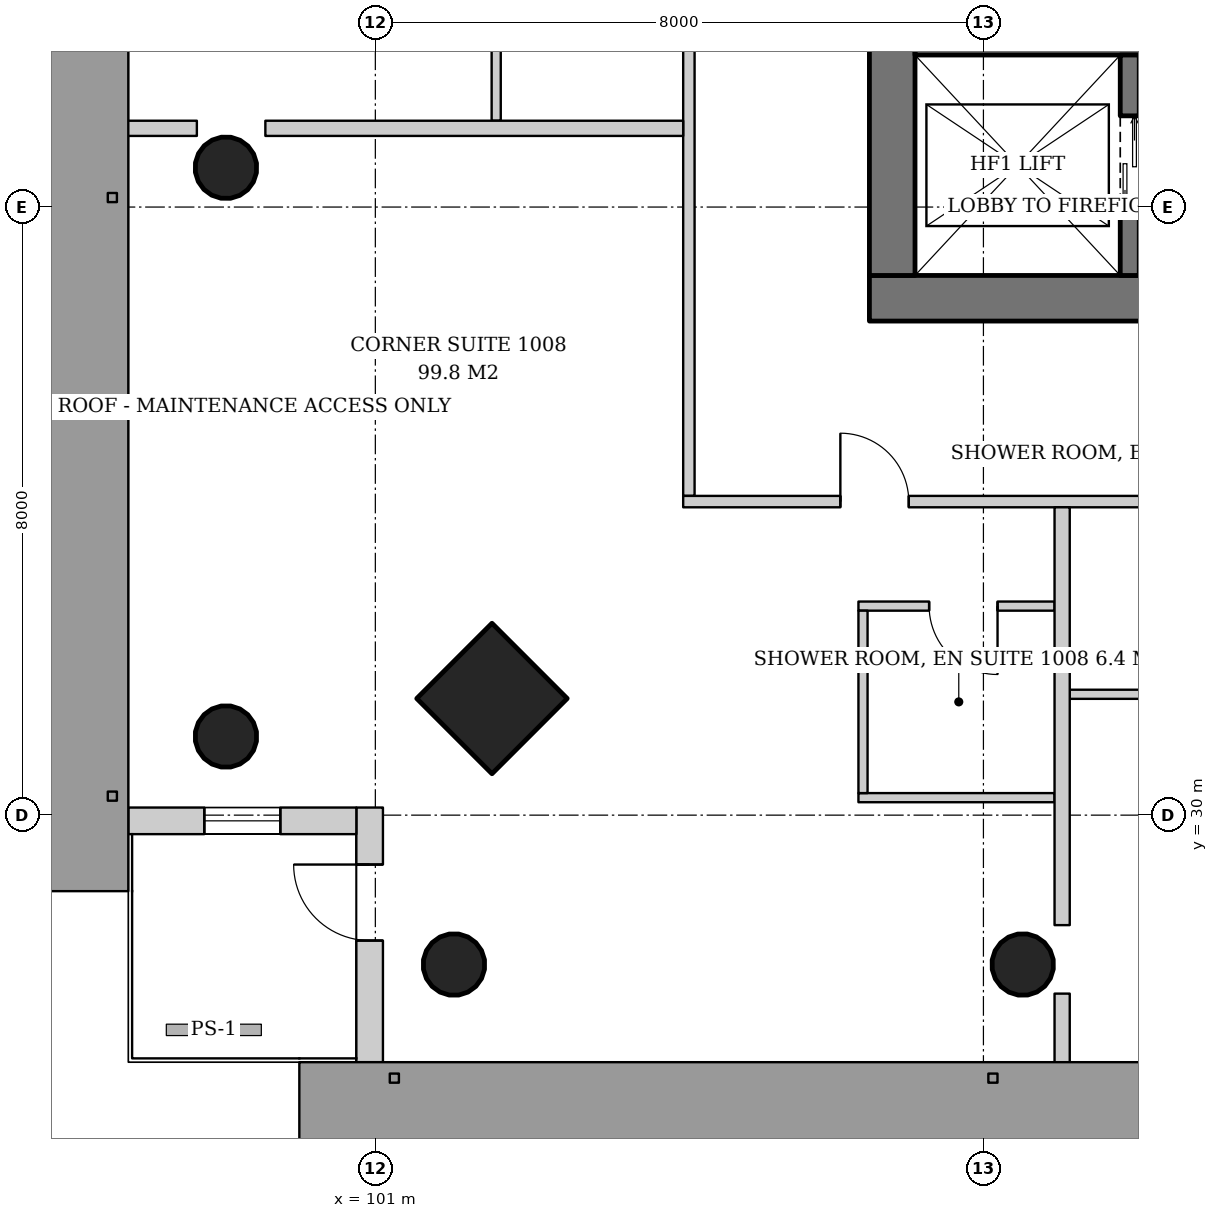
"""IFC4 building model, lengths in metres.
Left out: names, types, materials, properties, quantities, classifications, styles, units other than length and angle.
Written with IfcOpenShell. Run it as: python <this file> out.ifc"""

import sys

from ifc_helpers import new_model, si_unit, direction, frame, frame_2d, origin, origin_2d, place, context, subcontext, project, spatial, rectangle, hollow_circle, extrude, element, fill, save


model = new_model("IFC4")
c1 = context("Model", 3, precision=1e-05, world=origin(), true_north=direction((0.0, 1.0)))
c2 = subcontext(c1, "Body", "Model", "MODEL_VIEW")
j1 = project(units=[si_unit("LENGTHUNIT", "METRE"), si_unit("PLANEANGLEUNIT", "RADIAN")], contexts=[c1])
p1 = place(None, origin())
s1 = spatial("IfcSite", under=j1, at=p1, CompositionType="ELEMENT")
p2 = place(p1, origin())
s2 = spatial("IfcBuilding", under=s1, at=p2, CompositionType="ELEMENT")
p3 = place(p2, frame((0.0, 0.0, 43.8)))
s3 = spatial("IfcBuildingStorey", under=s2, at=p3, CompositionType="ELEMENT", Elevation=43.8)
p4 = place(p3, frame((102.483, 31.483, 0.0), z_axis=(0.043029647111, 0.043029647111, 0.998146732169), x_axis=(-0.707106781187, 0.707106781187, 0.0)))
e1 = element("IfcColumn", 1, at=p4, inside=s3, PredefinedType="COLUMN", context=c2, shape_type="SweptSolid", body=[
    extrude(rectangle(XDim=1.4, YDim=1.4, at=origin_2d()), origin(), (0.0, 0.0, 1.0), 3.807),
])
p5 = place(p3, frame((98.983, 30.983, 0.0), z_axis=(0.043029647111, 0.043029647111, 0.998146732169), x_axis=(-0.707106781187, 0.707106781187, 0.0)))
e2 = element("IfcColumn", 2, at=p5, inside=s3, PredefinedType="COLUMN", context=c2, shape_type="SweptSolid", body=[
    extrude(hollow_circle(Radius=0.406, WallThickness=0.03, at=origin_2d()), origin(), (0.0, 0.0, 1.0), 3.807),
])
p6 = place(p3, frame((98.983, 38.491, 0.0), z_axis=(0.043059584825, 0.021497706284, 0.998841188968), x_axis=(-0.446680166538, 0.894693706707, 0.0)))
e3 = element("IfcColumn", 3, at=p6, inside=s3, PredefinedType="COLUMN", context=c2, shape_type="SweptSolid", body=[
    extrude(hollow_circle(Radius=0.406, WallThickness=0.03, at=origin_2d()), origin(), (0.0, 0.0, 1.0), 3.804),
])
p7 = place(p3, frame((101.983, 27.983, 0.0), z_axis=(0.043029647111, 0.043029647111, 0.998146732169), x_axis=(-0.707106781187, 0.707106781187, 0.0)))
e4 = element("IfcColumn", 4, at=p7, inside=s3, PredefinedType="COLUMN", context=c2, shape_type="SweptSolid", body=[
    extrude(hollow_circle(Radius=0.406, WallThickness=0.03, at=origin_2d()), origin(), (0.0, 0.0, 1.0), 3.807),
])
p8 = place(p3, frame((109.491, 27.983, 0.0), z_axis=(0.021497706284, 0.043059584825, 0.998841188968), x_axis=(-0.894693706707, 0.446680166538, 0.0)))
e5 = element("IfcColumn", 5, at=p8, inside=s3, PredefinedType="COLUMN", context=c2, shape_type="SweptSolid", body=[
    extrude(hollow_circle(Radius=0.406, WallThickness=0.03, at=origin_2d()), origin(), (0.0, 0.0, 1.0), 3.804),
])
p9 = place(p3, frame((107.5, 36.8, 0.0), z_axis=(0.0, 0.0, 1.0), x_axis=(1.0, 0.0, 0.0)))
e6 = element("IfcWall", 6, at=p9, inside=s3, PredefinedType="SHEAR", context=c2, shape_type="SweptSolid", body=[
    extrude(rectangle(XDim=19.0, YDim=0.6, at=frame_2d((9.5, 0.0))), origin(), (0.0, 0.0, 1.0), 3.8),
])
p10 = place(p9, frame((3.9, 0.0, 0.0)))
e7 = element("IfcOpeningElement", 7, at=p10, cuts=e6, PredefinedType="OPENING", context=c2, shape_type="SweptSolid", body=[
    extrude(rectangle(XDim=1.0, YDim=2.1, at=frame_2d((0.5, 1.05))), frame((0.0, 0.31, 0.0), z_axis=(0.0, -1.0, 0.0), x_axis=(1.0, 0.0, 0.0)), (0.0, 0.0, 1.0), 0.62),
])
p11 = place(p9, frame((14.792, 0.0, 0.0)))
e8 = element("IfcOpeningElement", 8, at=p11, cuts=e6, PredefinedType="OPENING", context=c2, shape_type="SweptSolid", body=[
    extrude(rectangle(XDim=1.0, YDim=2.1, at=frame_2d((0.5, 1.05))), frame((0.0, 0.31, 0.0), z_axis=(0.0, -1.0, 0.0), x_axis=(1.0, 0.0, 0.0)), (0.0, 0.0, 1.0), 0.62),
])
p12 = place(p9, frame((17.005, 0.0, 0.0)))
e9 = element("IfcOpeningElement", 9, at=p12, cuts=e6, PredefinedType="OPENING", context=c2, shape_type="SweptSolid", body=[
    extrude(rectangle(XDim=1.0, YDim=2.1, at=frame_2d((0.5, 1.05))), frame((0.0, 0.31, 0.0), z_axis=(0.0, -1.0, 0.0), x_axis=(1.0, 0.0, 0.0)), (0.0, 0.0, 1.0), 0.62),
])
p13 = place(p3, frame((107.8, 37.1, 0.0), z_axis=(0.0, 0.0, 1.0), x_axis=(0.0, 1.0, 0.0)))
e10 = element("IfcWall", 10, at=p13, inside=s3, PredefinedType="SHEAR", context=c2, shape_type="SweptSolid", body=[
    extrude(rectangle(XDim=17.8, YDim=0.6, at=frame_2d((8.9, 0.0))), origin(), (0.0, 0.0, 1.0), 3.8),
])
p14 = place(p13, frame((8.0, 0.0, 0.0)))
e11 = element("IfcOpeningElement", 11, at=p14, cuts=e10, PredefinedType="OPENING", context=c2, shape_type="SweptSolid", body=[
    extrude(rectangle(XDim=1.8, YDim=2.4, at=frame_2d((0.9, 1.2))), frame((0.0, 0.31, 0.0), z_axis=(0.0, -1.0, 0.0), x_axis=(1.0, 0.0, 0.0)), (0.0, 0.0, 1.0), 0.62),
])
p15 = place(p3, frame((108.1, 40.2, 0.0), z_axis=(0.0, 0.0, 1.0), x_axis=(1.0, 0.0, 0.0)))
e12 = element("IfcWall", 12, at=p15, inside=s3, PredefinedType="SHEAR", context=c2, shape_type="SweptSolid", body=[
    extrude(rectangle(XDim=17.8, YDim=0.4, at=frame_2d((8.9, 0.0))), origin(), (0.0, 0.0, 1.0), 3.8),
])
p16 = place(p3, frame((100.925, 26.75, 0.0), z_axis=(0.0, 0.0, 1.0), x_axis=(0.0, 1.0, 0.0)))
e13 = element("IfcWall", 13, at=p16, inside=s3, PredefinedType="SOLIDWALL", context=c2, shape_type="SweptSolid", body=[
    extrude(rectangle(XDim=3.35, YDim=0.35, at=frame_2d((1.675, 0.0))), origin(), (0.0, 0.0, 1.0), 3.6),
])
p17 = place(p16, frame((1.6, 0.0, 0.0)))
e14 = element("IfcOpeningElement", 14, at=p17, cuts=e13, PredefinedType="OPENING", context=c2, shape_type="SweptSolid", body=[
    extrude(rectangle(XDim=1.0, YDim=2.4, at=frame_2d((0.5, 1.2))), frame((0.0, 0.185, 0.0), z_axis=(0.0, -1.0, 0.0), x_axis=(1.0, 0.0, 0.0)), (0.0, 0.0, 1.0), 0.37),
])
p18 = place(p3, frame((100.75, 29.925, 0.0), z_axis=(0.0, 0.0, 1.0), x_axis=(-1.0, 0.0, 0.0)))
e15 = element("IfcWall", 15, at=p18, inside=s3, PredefinedType="SOLIDWALL", context=c2, shape_type="SweptSolid", body=[
    extrude(rectangle(XDim=3.0, YDim=0.35, at=frame_2d((1.5, 0.0))), origin(), (0.0, 0.0, 1.0), 3.6),
])
p19 = place(p18, frame((1.0, 0.0, 0.9)))
e16 = element("IfcOpeningElement", 16, at=p19, cuts=e15, PredefinedType="OPENING", context=c2, shape_type="SweptSolid", body=[
    extrude(rectangle(XDim=1.0, YDim=2.4, at=frame_2d((0.5, 1.2))), frame((0.0, 0.185, 0.0), z_axis=(0.0, -1.0, 0.0), x_axis=(1.0, 0.0, 0.0)), (0.0, 0.0, 1.0), 0.37),
])
p20 = place(p3, frame((110.925, 37.1, 0.0), z_axis=(0.0, 0.0, 1.0), x_axis=(0.0, 1.0, 0.0)))
e17 = element("IfcWall", 17, at=p20, inside=s3, PredefinedType="SHEAR", context=c2, shape_type="SweptSolid", body=[
    extrude(rectangle(XDim=2.9, YDim=0.25, at=frame_2d((1.45, 0.0))), origin(), (0.0, 0.0, 1.0), 3.8),
])
p21 = place(p20, frame((0.8, 0.0, 0.0)))
e18 = element("IfcOpeningElement", 18, at=p21, cuts=e17, PredefinedType="OPENING", context=c2, shape_type="SweptSolid", body=[
    extrude(rectangle(XDim=1.3, YDim=2.2, at=frame_2d((0.65, 1.1))), frame((0.0, 0.135, 0.0), z_axis=(0.0, -1.0, 0.0), x_axis=(1.0, 0.0, 0.0)), (0.0, 0.0, 1.0), 0.27),
])
p22 = place(p3, frame((102.59, 41.556, 0.0), z_axis=(0.0, 0.0, 1.0), x_axis=(0.0, -1.0, 0.0)))
e19 = element("IfcWall", 19, at=p22, inside=s3, PredefinedType="PARTITIONING", context=c2, shape_type="SweptSolid", body=[
    extrude(rectangle(XDim=2.42, YDim=0.12, at=frame_2d((1.21, 0.0))), origin(), (0.0, 0.0, 1.0), 2.847),
])
p23 = place(p3, frame((105.125, 57.95, 0.0), z_axis=(0.0, 0.0, 1.0), x_axis=(0.0, -1.0, 0.0)))
e20 = element("IfcWall", 20, at=p23, inside=s3, PredefinedType="PARTITIONING", context=c2, shape_type="SweptSolid", body=[
    extrude(rectangle(XDim=23.75, YDim=0.15, at=frame_2d((11.875, 0.0))), origin(), (0.0, 0.0, 1.0), 2.8),
])
p24 = place(p23, frame((2.068, 0.0, 0.0)))
e21 = element("IfcOpeningElement", 21, at=p24, cuts=e20, PredefinedType="OPENING", context=c2, shape_type="SweptSolid", body=[
    extrude(rectangle(XDim=0.9, YDim=2.1, at=frame_2d((0.45, 1.05))), frame((0.0, 0.085, 0.0), z_axis=(0.0, -1.0, 0.0), x_axis=(1.0, 0.0, 0.0)), (0.0, 0.0, 1.0), 0.17),
])
p25 = place(p23, frame((7.686, 0.0, 0.0)))
e22 = element("IfcOpeningElement", 22, at=p25, cuts=e20, PredefinedType="OPENING", context=c2, shape_type="SweptSolid", body=[
    extrude(rectangle(XDim=1.0, YDim=2.1, at=frame_2d((0.5, 1.05))), frame((0.0, 0.085, 0.0), z_axis=(0.0, -1.0, 0.0), x_axis=(1.0, 0.0, 0.0)), (0.0, 0.0, 1.0), 0.17),
])
p26 = place(p23, frame((12.379, 0.0, 0.0)))
e23 = element("IfcOpeningElement", 23, at=p26, cuts=e20, PredefinedType="OPENING", context=c2, shape_type="SweptSolid", body=[
    extrude(rectangle(XDim=0.9, YDim=2.1, at=frame_2d((0.45, 1.05))), frame((0.0, 0.085, 0.0), z_axis=(0.0, -1.0, 0.0), x_axis=(1.0, 0.0, 0.0)), (0.0, 0.0, 1.0), 0.17),
])
p27 = place(p23, frame((15.264, 0.0, 0.0)))
e24 = element("IfcOpeningElement", 24, at=p27, cuts=e20, PredefinedType="OPENING", context=c2, shape_type="SweptSolid", body=[
    extrude(rectangle(XDim=0.9, YDim=2.1, at=frame_2d((0.45, 1.05))), frame((0.0, 0.085, 0.0), z_axis=(0.0, -1.0, 0.0), x_axis=(1.0, 0.0, 0.0)), (0.0, 0.0, 1.0), 0.17),
])
p28 = place(p3, frame((105.05, 39.036, 0.0), z_axis=(0.0, 0.0, 1.0), x_axis=(-1.0, 0.0, 0.0)))
e25 = element("IfcWall", 25, at=p28, inside=s3, PredefinedType="PARTITIONING", context=c2, shape_type="SweptSolid", body=[
    extrude(rectangle(XDim=5.497, YDim=0.2, at=frame_2d((2.749, 0.0))), origin(), (0.0, 0.0, 1.0), 3.6),
])
p29 = place(p3, frame((98.652, 39.036, 0.0), z_axis=(0.0, 0.0, 1.0), x_axis=(-1.0, 0.0, 0.0)))
e26 = element("IfcWall", 26, at=p29, inside=s3, PredefinedType="PARTITIONING", context=c2, shape_type="SweptSolid", body=[
    extrude(rectangle(XDim=0.942, YDim=0.2, at=frame_2d((0.471, 0.0))), origin(), (0.0, 0.0, 1.0), 3.6),
])
p30 = place(p3, frame((109.936, 32.75, 0.0), z_axis=(0.0, 0.0, 1.0), x_axis=(-1.0, 0.0, 0.0)))
e27 = element("IfcWall", 27, at=p30, inside=s3, PredefinedType="PARTITIONING", context=c2, shape_type="SweptSolid", body=[
    extrude(rectangle(XDim=2.58, YDim=0.12, at=frame_2d((1.29, 0.0))), origin(), (0.0, 0.0, 1.0), 2.8),
])
p31 = place(p30, frame((0.75, 0.0, 0.0)))
e28 = element("IfcOpeningElement", 28, at=p31, cuts=e27, PredefinedType="OPENING", context=c2, shape_type="SweptSolid", body=[
    extrude(rectangle(XDim=0.9, YDim=2.1, at=frame_2d((0.45, 1.05))), frame((0.0, 0.07, 0.0), z_axis=(0.0, -1.0, 0.0), x_axis=(1.0, 0.0, 0.0)), (0.0, 0.0, 1.0), 0.14),
])
p32 = place(p3, frame((109.936, 30.23, 0.0), z_axis=(0.0, 0.0, 1.0), x_axis=(-1.0, 0.0, 0.0)))
e29 = element("IfcWall", 29, at=p32, inside=s3, PredefinedType="PARTITIONING", context=c2, shape_type="SweptSolid", body=[
    extrude(rectangle(XDim=2.58, YDim=0.12, at=frame_2d((1.29, 0.0))), origin(), (0.0, 0.0, 1.0), 2.8),
])
p33 = place(p3, frame((107.416, 32.69, 0.0), z_axis=(0.0, 0.0, 1.0), x_axis=(0.0, -1.0, 0.0)))
e30 = element("IfcWall", 30, at=p33, inside=s3, PredefinedType="PARTITIONING", context=c2, shape_type="SweptSolid", body=[
    extrude(rectangle(XDim=2.4, YDim=0.12, at=frame_2d((1.2, 0.0))), origin(), (0.0, 0.0, 1.0), 2.847),
])
p34 = place(p3, frame((110.136, 31.59, 0.0), z_axis=(0.0, 0.0, 1.0), x_axis=(1.0, 0.0, 0.0)))
e31 = element("IfcWall", 31, at=p34, inside=s3, PredefinedType="PARTITIONING", context=c2, shape_type="SweptSolid", body=[
    extrude(rectangle(XDim=2.42, YDim=0.12, at=frame_2d((1.21, 0.0))), origin(), (0.0, 0.0, 1.0), 2.847),
])
p35 = place(p3, frame((105.05, 34.125, 0.0), z_axis=(0.0, 0.0, 1.0), x_axis=(1.0, 0.0, 0.0)))
e32 = element("IfcWall", 32, at=p35, inside=s3, PredefinedType="PARTITIONING", context=c2, shape_type="SweptSolid", body=[
    extrude(rectangle(XDim=23.75, YDim=0.15, at=frame_2d((11.875, 0.0))), origin(), (0.0, 0.0, 1.0), 2.8),
])
p36 = place(p35, frame((2.068, 0.0, 0.0)))
e33 = element("IfcOpeningElement", 33, at=p36, cuts=e32, PredefinedType="OPENING", context=c2, shape_type="SweptSolid", body=[
    extrude(rectangle(XDim=0.9, YDim=2.1, at=frame_2d((0.45, 1.05))), frame((0.0, 0.085, 0.0), z_axis=(0.0, -1.0, 0.0), x_axis=(1.0, 0.0, 0.0)), (0.0, 0.0, 1.0), 0.17),
])
p37 = place(p35, frame((7.736, 0.0, 0.0)))
e34 = element("IfcOpeningElement", 34, at=p37, cuts=e32, PredefinedType="OPENING", context=c2, shape_type="SweptSolid", body=[
    extrude(rectangle(XDim=0.9, YDim=2.1, at=frame_2d((0.45, 1.05))), frame((0.0, 0.085, 0.0), z_axis=(0.0, -1.0, 0.0), x_axis=(1.0, 0.0, 0.0)), (0.0, 0.0, 1.0), 0.17),
])
p38 = place(p35, frame((17.021, 0.0, 0.0)))
e35 = element("IfcOpeningElement", 35, at=p38, cuts=e32, PredefinedType="OPENING", context=c2, shape_type="SweptSolid", body=[
    extrude(rectangle(XDim=0.9, YDim=2.1, at=frame_2d((0.45, 1.05))), frame((0.0, 0.085, 0.0), z_axis=(0.0, -1.0, 0.0), x_axis=(1.0, 0.0, 0.0)), (0.0, 0.0, 1.0), 0.17),
])
p39 = place(p3, frame((110.036, 34.05, 0.0), z_axis=(0.0, 0.0, 1.0), x_axis=(0.0, -1.0, 0.0)))
e36 = element("IfcWall", 36, at=p39, inside=s3, PredefinedType="PARTITIONING", context=c2, shape_type="SweptSolid", body=[
    extrude(rectangle(XDim=5.497, YDim=0.2, at=frame_2d((2.749, 0.0))), origin(), (0.0, 0.0, 1.0), 3.6),
])
p40 = place(p3, frame((110.036, 27.652, 0.0), z_axis=(0.0, 0.0, 1.0), x_axis=(0.0, -1.0, 0.0)))
e37 = element("IfcWall", 37, at=p40, inside=s3, PredefinedType="PARTITIONING", context=c2, shape_type="SweptSolid", body=[
    extrude(rectangle(XDim=0.942, YDim=0.2, at=frame_2d((0.471, 0.0))), origin(), (0.0, 0.0, 1.0), 3.6),
])
p41 = place(p17, origin())
e38 = element("IfcDoor", 38, at=p41, inside=s3, OperationType="SINGLE_SWING_RIGHT", PredefinedType="DOOR", context=c2, shape_type="SweptSolid", body=[
    extrude(rectangle(XDim=1.0, YDim=2.4, at=frame_2d((0.5, 1.2))), frame((0.0, 0.025, 0.0), z_axis=(0.0, -1.0, 0.0), x_axis=(1.0, 0.0, 0.0)), (0.0, 0.0, 1.0), 0.05),
])
fill(e14, e38)
p42 = place(p19, origin())
e39 = element("IfcWindow", 39, at=p42, inside=s3, PartitioningType="SINGLE_PANEL", PredefinedType="WINDOW", context=c2, shape_type="SweptSolid", body=[
    extrude(rectangle(XDim=1.0, YDim=2.4, at=frame_2d((0.5, 1.2))), frame((0.0, 0.03, 0.0), z_axis=(0.0, -1.0, 0.0), x_axis=(1.0, 0.0, 0.0)), (0.0, 0.0, 1.0), 0.06),
])
fill(e16, e39)
p43 = place(p21, origin())
e40 = element("IfcDoor", 40, at=p43, inside=s3, OperationType="DOUBLE_DOOR_SLIDING", PredefinedType="DOOR", context=c2, shape_type="SweptSolid", body=[
    extrude(rectangle(XDim=1.3, YDim=2.2, at=frame_2d((0.65, 1.1))), frame((0.0, 0.025, 0.0), z_axis=(0.0, -1.0, 0.0), x_axis=(1.0, 0.0, 0.0)), (0.0, 0.0, 1.0), 0.05),
])
fill(e18, e40)
p44 = place(p31, origin())
e41 = element("IfcDoor", 41, at=p44, inside=s3, OperationType="SINGLE_SWING_LEFT", PredefinedType="DOOR", context=c2, shape_type="SweptSolid", body=[
    extrude(rectangle(XDim=0.9, YDim=2.1, at=frame_2d((0.45, 1.05))), frame((0.0, 0.025, 0.0), z_axis=(0.0, -1.0, 0.0), x_axis=(1.0, 0.0, 0.0)), (0.0, 0.0, 1.0), 0.05),
])
fill(e28, e41)
p45 = place(p36, origin())
e42 = element("IfcDoor", 42, at=p45, inside=s3, OperationType="SINGLE_SWING_LEFT", PredefinedType="DOOR", context=c2, shape_type="SweptSolid", body=[
    extrude(rectangle(XDim=0.9, YDim=2.1, at=frame_2d((0.45, 1.05))), frame((0.0, 0.025, 0.0), z_axis=(0.0, -1.0, 0.0), x_axis=(1.0, 0.0, 0.0)), (0.0, 0.0, 1.0), 0.05),
])
fill(e33, e42)
save(model, sys.argv[1])
